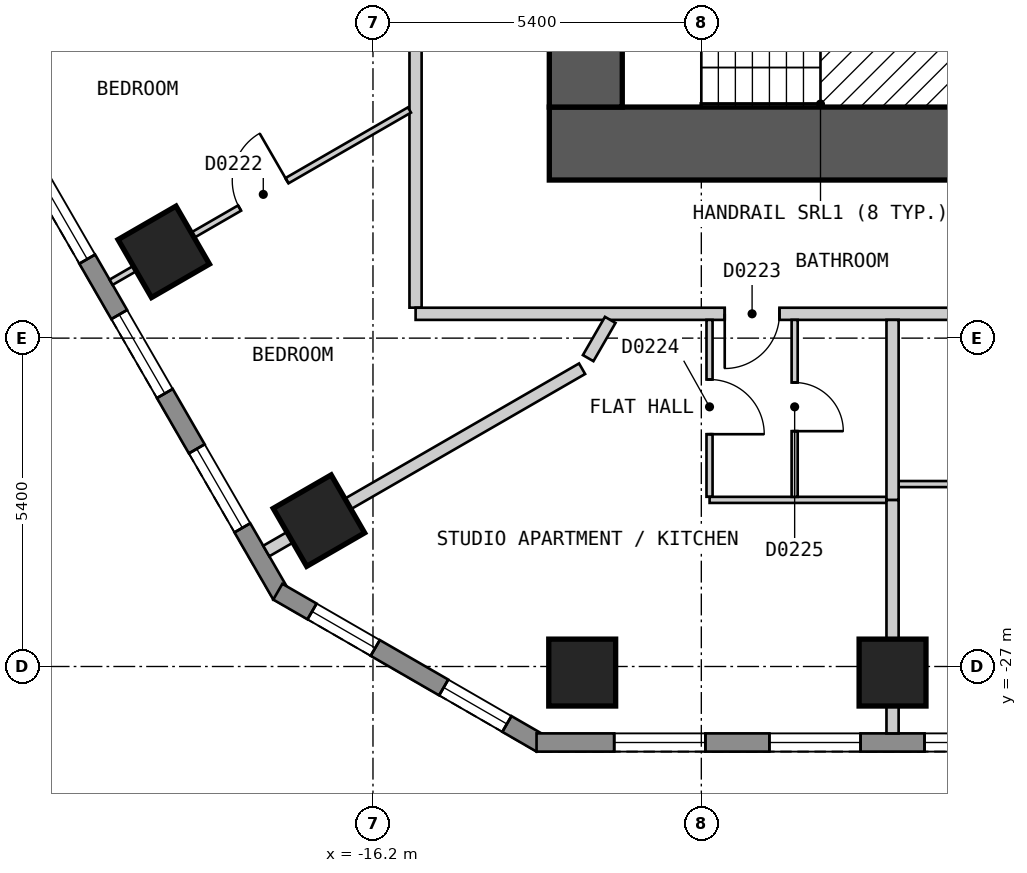
"""IFC4 building model, lengths in metres.
Left out: names, types, materials, properties, quantities, classifications, styles, units other than length and angle.
Written with IfcOpenShell. Run it as: python <this file> out.ifc"""

import sys

from ifc_helpers import new_model, si_unit, direction, frame, frame_2d, origin, origin_2d, place, context, subcontext, project, spatial, polyline, rectangle, outline, extrude, element, fill, save


model = new_model("IFC4")
c1 = context("Model", 3, precision=1e-05, world=origin(), true_north=direction((0.0, 1.0)))
c2 = subcontext(c1, "Body", "Model", "MODEL_VIEW")
j1 = project(units=[si_unit("LENGTHUNIT", "METRE"), si_unit("PLANEANGLEUNIT", "RADIAN")], contexts=[c1])
p1 = place(None, origin())
s1 = spatial("IfcSite", under=j1, at=p1, CompositionType="ELEMENT")
p2 = place(p1, origin())
s2 = spatial("IfcBuilding", under=s1, at=p2, CompositionType="ELEMENT")
p3 = place(p2, frame((0.0, 0.0, 41.4)))
s3 = spatial("IfcBuildingStorey", under=s2, at=p3, CompositionType="ELEMENT", Elevation=41.4)
for number, where, z_axis, x_axis in (
    (1, (-19.641, -20.181, 0.0), (0.0, 0.0, 1.0), (0.5, -0.866, 0.0)),
    (2, (-17.089, -24.601, 0.0), (0.0, 0.0, 1.0), (0.5, -0.866, 0.0)),
    (3, (-12.759, -27.1, 0.0), (0.0, 0.0, 1.0), (1.0, 0.0, 0.0)),
    (4, (-7.655, -27.1, 0.0), (0.0, 0.0, 1.0), (1.0, 0.0, 0.0)),
):
    element("IfcColumn", number, at=place(p3, frame(where, z_axis=z_axis, x_axis=x_axis)), inside=s3, PredefinedType="COLUMN", context=c2, shape_type="SweptSolid", body=[
        extrude(rectangle(XDim=1.1, YDim=1.1, at=origin_2d()), origin(), (0.0, 0.0, 1.0), 3.0),
    ])
p4 = place(p3, frame((-13.3, -18.4, 0.0), z_axis=(0.0, 0.0, 1.0), x_axis=(1.0, 0.0, 0.0)))
e5 = element("IfcWall", 5, at=p4, inside=s3, PredefinedType="SHEAR", context=c2, shape_type="SweptSolid", body=[
    extrude(rectangle(XDim=26.6, YDim=1.2, at=frame_2d((13.3, 0.0))), origin(), (0.0, 0.0, 1.0), 2.7),
])
p5 = place(p3, frame((-12.7, -17.8, 0.0), z_axis=(0.0, 0.0, 1.0), x_axis=(0.0, 1.0, 0.0)))
e6 = element("IfcWall", 6, at=p5, inside=s3, PredefinedType="SHEAR", context=c2, shape_type="SweptSolid", body=[
    extrude(rectangle(XDim=11.6, YDim=1.2, at=frame_2d((5.8, 0.0))), origin(), (0.0, 0.0, 1.0), 2.7),
])
p6 = place(p5, frame((3.6, 0.0, 0.0)))
e7 = element("IfcOpeningElement", 7, at=p6, cuts=e6, PredefinedType="OPENING", context=c2, shape_type="SweptSolid", body=[
    extrude(rectangle(XDim=1.2, YDim=2.1, at=frame_2d((0.6, 1.05))), frame((0.0, 0.61, 0.0), z_axis=(0.0, -1.0, 0.0), x_axis=(1.0, 0.0, 0.0)), (0.0, 0.0, 1.0), 1.22),
])
p7 = place(p3, frame((-31.22, -2.425, 0.0), z_axis=(0.0, 0.0, 1.0), x_axis=(0.500001938803, -0.866024284413, 0.0)))
e8 = element("IfcWall", 8, at=p7, inside=s3, PredefinedType="SOLIDWALL", context=c2, shape_type="SweptSolid", body=[
    extrude(outline(polyline([(0.0, -0.15), (27.02, -0.15), (26.94, 0.15), (0.08, 0.15), (0.0, -0.15)])), origin(), (0.0, 0.0, 1.0), 2.7),
])
p8 = place(p7, frame((1.277, 0.0, 0.15)))
e9 = element("IfcOpeningElement", 9, at=p8, cuts=e8, PredefinedType="OPENING", context=c2, shape_type="SweptSolid", body=[
    extrude(rectangle(XDim=1.5, YDim=2.1, at=frame_2d((0.75, 1.05))), frame((0.0, 0.16, 0.0), z_axis=(0.0, -1.0, 0.0), x_axis=(1.0, 0.0, 0.0)), (0.0, 0.0, 1.0), 0.32),
])
p9 = place(p7, frame((3.829, 0.0, 0.15)))
e10 = element("IfcOpeningElement", 10, at=p9, cuts=e8, PredefinedType="OPENING", context=c2, shape_type="SweptSolid", body=[
    extrude(rectangle(XDim=1.5, YDim=2.1, at=frame_2d((0.75, 1.05))), frame((0.0, 0.16, 0.0), z_axis=(0.0, -1.0, 0.0), x_axis=(1.0, 0.0, 0.0)), (0.0, 0.0, 1.0), 0.32),
])
p10 = place(p7, frame((6.382, 0.0, 0.15)))
e11 = element("IfcOpeningElement", 11, at=p10, cuts=e8, PredefinedType="OPENING", context=c2, shape_type="SweptSolid", body=[
    extrude(rectangle(XDim=1.5, YDim=2.1, at=frame_2d((0.75, 1.05))), frame((0.0, 0.16, 0.0), z_axis=(0.0, -1.0, 0.0), x_axis=(1.0, 0.0, 0.0)), (0.0, 0.0, 1.0), 0.32),
])
p11 = place(p7, frame((8.933, 0.0, 0.15)))
e12 = element("IfcOpeningElement", 12, at=p11, cuts=e8, PredefinedType="OPENING", context=c2, shape_type="SweptSolid", body=[
    extrude(rectangle(XDim=1.5, YDim=2.1, at=frame_2d((0.75, 1.05))), frame((0.0, 0.16, 0.0), z_axis=(0.0, -1.0, 0.0), x_axis=(1.0, 0.0, 0.0)), (0.0, 0.0, 1.0), 0.32),
])
p12 = place(p7, frame((11.485, 0.0, 0.15)))
e13 = element("IfcOpeningElement", 13, at=p12, cuts=e8, PredefinedType="OPENING", context=c2, shape_type="SweptSolid", body=[
    extrude(rectangle(XDim=1.5, YDim=2.1, at=frame_2d((0.75, 1.05))), frame((0.0, 0.16, 0.0), z_axis=(0.0, -1.0, 0.0), x_axis=(1.0, 0.0, 0.0)), (0.0, 0.0, 1.0), 0.32),
])
p13 = place(p7, frame((14.037, 0.0, 0.15)))
e14 = element("IfcOpeningElement", 14, at=p13, cuts=e8, PredefinedType="OPENING", context=c2, shape_type="SweptSolid", body=[
    extrude(rectangle(XDim=1.5, YDim=2.1, at=frame_2d((0.75, 1.05))), frame((0.0, 0.16, 0.0), z_axis=(0.0, -1.0, 0.0), x_axis=(1.0, 0.0, 0.0)), (0.0, 0.0, 1.0), 0.32),
])
p14 = place(p7, frame((16.589, 0.0, 0.15)))
e15 = element("IfcOpeningElement", 15, at=p14, cuts=e8, PredefinedType="OPENING", context=c2, shape_type="SweptSolid", body=[
    extrude(rectangle(XDim=1.5, YDim=2.1, at=frame_2d((0.75, 1.05))), frame((0.0, 0.16, 0.0), z_axis=(0.0, -1.0, 0.0), x_axis=(1.0, 0.0, 0.0)), (0.0, 0.0, 1.0), 0.32),
])
p15 = place(p7, frame((19.141, 0.0, 0.15)))
e16 = element("IfcOpeningElement", 16, at=p15, cuts=e8, PredefinedType="OPENING", context=c2, shape_type="SweptSolid", body=[
    extrude(rectangle(XDim=1.5, YDim=2.1, at=frame_2d((0.75, 1.05))), frame((0.0, 0.16, 0.0), z_axis=(0.0, -1.0, 0.0), x_axis=(1.0, 0.0, 0.0)), (0.0, 0.0, 1.0), 0.32),
])
p16 = place(p7, frame((21.693, 0.0, 0.15)))
e17 = element("IfcOpeningElement", 17, at=p16, cuts=e8, PredefinedType="OPENING", context=c2, shape_type="SweptSolid", body=[
    extrude(rectangle(XDim=1.5, YDim=2.1, at=frame_2d((0.75, 1.05))), frame((0.0, 0.16, 0.0), z_axis=(0.0, -1.0, 0.0), x_axis=(1.0, 0.0, 0.0)), (0.0, 0.0, 1.0), 0.32),
])
p17 = place(p7, frame((24.244, 0.0, 0.15)))
e18 = element("IfcOpeningElement", 18, at=p17, cuts=e8, PredefinedType="OPENING", context=c2, shape_type="SweptSolid", body=[
    extrude(rectangle(XDim=1.5, YDim=2.1, at=frame_2d((0.75, 1.05))), frame((0.0, 0.16, 0.0), z_axis=(0.0, -1.0, 0.0), x_axis=(1.0, 0.0, 0.0)), (0.0, 0.0, 1.0), 0.32),
])
p18 = place(p3, frame((-17.765, -25.77, 0.0), z_axis=(0.0, 0.0, 1.0), x_axis=(0.866010750942, -0.50002537861, 0.0)))
e19 = element("IfcWall", 19, at=p18, inside=s3, PredefinedType="SOLIDWALL", context=c2, shape_type="SweptSolid", body=[
    extrude(outline(polyline([(0.0, -0.15), (5.0, -0.15), (4.919, 0.15), (0.08, 0.15), (0.0, -0.15)])), origin(), (0.0, 0.0, 1.0), 2.7),
])
p19 = place(p18, frame((0.65, 0.0, 0.15)))
e20 = element("IfcOpeningElement", 20, at=p19, cuts=e19, PredefinedType="OPENING", context=c2, shape_type="SweptSolid", body=[
    extrude(rectangle(XDim=1.2, YDim=2.1, at=frame_2d((0.6, 1.05))), frame((0.0, 0.16, 0.0), z_axis=(0.0, -1.0, 0.0), x_axis=(1.0, 0.0, 0.0)), (0.0, 0.0, 1.0), 0.32),
])
p20 = place(p18, frame((3.15, 0.0, 0.15)))
e21 = element("IfcOpeningElement", 21, at=p20, cuts=e19, PredefinedType="OPENING", context=c2, shape_type="SweptSolid", body=[
    extrude(rectangle(XDim=1.2, YDim=2.1, at=frame_2d((0.6, 1.05))), frame((0.0, 0.16, 0.0), z_axis=(0.0, -1.0, 0.0), x_axis=(1.0, 0.0, 0.0)), (0.0, 0.0, 1.0), 0.32),
])
p21 = place(p3, frame((-13.51, -28.25, 0.0), z_axis=(0.0, 0.0, 1.0), x_axis=(1.0, 0.0, 0.0)))
e22 = element("IfcWall", 22, at=p21, inside=s3, PredefinedType="SOLIDWALL", context=c2, shape_type="SweptSolid", body=[
    extrude(outline(polyline([(0.0, -0.15), (27.02, -0.15), (26.94, 0.15), (0.08, 0.15), (0.0, -0.15)])), origin(), (0.0, 0.0, 1.0), 2.7),
])
p22 = place(p21, frame((1.277, 0.0, 0.15)))
e23 = element("IfcOpeningElement", 23, at=p22, cuts=e22, PredefinedType="OPENING", context=c2, shape_type="SweptSolid", body=[
    extrude(rectangle(XDim=1.5, YDim=2.1, at=frame_2d((0.75, 1.05))), frame((0.0, 0.16, 0.0), z_axis=(0.0, -1.0, 0.0), x_axis=(1.0, 0.0, 0.0)), (0.0, 0.0, 1.0), 0.32),
])
p23 = place(p21, frame((3.829, 0.0, 0.15)))
e24 = element("IfcOpeningElement", 24, at=p23, cuts=e22, PredefinedType="OPENING", context=c2, shape_type="SweptSolid", body=[
    extrude(rectangle(XDim=1.5, YDim=2.1, at=frame_2d((0.75, 1.05))), frame((0.0, 0.16, 0.0), z_axis=(0.0, -1.0, 0.0), x_axis=(1.0, 0.0, 0.0)), (0.0, 0.0, 1.0), 0.32),
])
p24 = place(p21, frame((6.381, 0.0, 0.15)))
e25 = element("IfcOpeningElement", 25, at=p24, cuts=e22, PredefinedType="OPENING", context=c2, shape_type="SweptSolid", body=[
    extrude(rectangle(XDim=1.5, YDim=2.1, at=frame_2d((0.75, 1.05))), frame((0.0, 0.16, 0.0), z_axis=(0.0, -1.0, 0.0), x_axis=(1.0, 0.0, 0.0)), (0.0, 0.0, 1.0), 0.32),
])
p25 = place(p21, frame((8.933, 0.0, 0.15)))
e26 = element("IfcOpeningElement", 26, at=p25, cuts=e22, PredefinedType="OPENING", context=c2, shape_type="SweptSolid", body=[
    extrude(rectangle(XDim=1.5, YDim=2.1, at=frame_2d((0.75, 1.05))), frame((0.0, 0.16, 0.0), z_axis=(0.0, -1.0, 0.0), x_axis=(1.0, 0.0, 0.0)), (0.0, 0.0, 1.0), 0.32),
])
p26 = place(p21, frame((11.485, 0.0, 0.15)))
e27 = element("IfcOpeningElement", 27, at=p26, cuts=e22, PredefinedType="OPENING", context=c2, shape_type="SweptSolid", body=[
    extrude(rectangle(XDim=1.5, YDim=2.1, at=frame_2d((0.75, 1.05))), frame((0.0, 0.16, 0.0), z_axis=(0.0, -1.0, 0.0), x_axis=(1.0, 0.0, 0.0)), (0.0, 0.0, 1.0), 0.32),
])
p27 = place(p21, frame((14.037, 0.0, 0.15)))
e28 = element("IfcOpeningElement", 28, at=p27, cuts=e22, PredefinedType="OPENING", context=c2, shape_type="SweptSolid", body=[
    extrude(rectangle(XDim=1.5, YDim=2.1, at=frame_2d((0.75, 1.05))), frame((0.0, 0.16, 0.0), z_axis=(0.0, -1.0, 0.0), x_axis=(1.0, 0.0, 0.0)), (0.0, 0.0, 1.0), 0.32),
])
p28 = place(p21, frame((16.589, 0.0, 0.15)))
e29 = element("IfcOpeningElement", 29, at=p28, cuts=e22, PredefinedType="OPENING", context=c2, shape_type="SweptSolid", body=[
    extrude(rectangle(XDim=1.5, YDim=2.1, at=frame_2d((0.75, 1.05))), frame((0.0, 0.16, 0.0), z_axis=(0.0, -1.0, 0.0), x_axis=(1.0, 0.0, 0.0)), (0.0, 0.0, 1.0), 0.32),
])
p29 = place(p21, frame((19.141, 0.0, 0.15)))
e30 = element("IfcOpeningElement", 30, at=p29, cuts=e22, PredefinedType="OPENING", context=c2, shape_type="SweptSolid", body=[
    extrude(rectangle(XDim=1.5, YDim=2.1, at=frame_2d((0.75, 1.05))), frame((0.0, 0.16, 0.0), z_axis=(0.0, -1.0, 0.0), x_axis=(1.0, 0.0, 0.0)), (0.0, 0.0, 1.0), 0.32),
])
p30 = place(p21, frame((21.693, 0.0, 0.15)))
e31 = element("IfcOpeningElement", 31, at=p30, cuts=e22, PredefinedType="OPENING", context=c2, shape_type="SweptSolid", body=[
    extrude(rectangle(XDim=1.5, YDim=2.1, at=frame_2d((0.75, 1.05))), frame((0.0, 0.16, 0.0), z_axis=(0.0, -1.0, 0.0), x_axis=(1.0, 0.0, 0.0)), (0.0, 0.0, 1.0), 0.32),
])
p31 = place(p21, frame((24.245, 0.0, 0.15)))
e32 = element("IfcOpeningElement", 32, at=p31, cuts=e22, PredefinedType="OPENING", context=c2, shape_type="SweptSolid", body=[
    extrude(rectangle(XDim=1.5, YDim=2.1, at=frame_2d((0.75, 1.05))), frame((0.0, 0.16, 0.0), z_axis=(0.0, -1.0, 0.0), x_axis=(1.0, 0.0, 0.0)), (0.0, 0.0, 1.0), 0.32),
])
p32 = place(p3, frame((-15.5, -16.5, 0.0), z_axis=(0.0, 0.0, 1.0), x_axis=(0.0, -1.0, 0.0)))
e33 = element("IfcWall", 33, at=p32, inside=s3, PredefinedType="PARTITIONING", context=c2, shape_type="SweptSolid", body=[
    extrude(rectangle(XDim=4.599, YDim=0.2, at=frame_2d((2.3, 0.0))), origin(), (0.0, 0.0, 1.0), 2.7),
])
p33 = place(p3, frame((-15.499, -21.2, 0.0), z_axis=(0.0, 0.0, 1.0), x_axis=(1.0, 0.0, 0.0)))
e34 = element("IfcWall", 34, at=p33, inside=s3, PredefinedType="PARTITIONING", context=c2, shape_type="SweptSolid", body=[
    extrude(rectangle(XDim=30.898, YDim=0.2, at=frame_2d((15.449, 0.0))), origin(), (0.0, 0.0, 1.0), 2.7),
])
p34 = place(p33, frame((5.084, 0.0, 0.0)))
e35 = element("IfcOpeningElement", 35, at=p34, cuts=e34, PredefinedType="OPENING", context=c2, shape_type="SweptSolid", body=[
    extrude(rectangle(XDim=0.9, YDim=2.1, at=frame_2d((0.45, 1.05))), frame((0.0, 0.11, 0.0), z_axis=(0.0, -1.0, 0.0), x_axis=(1.0, 0.0, 0.0)), (0.0, 0.0, 1.0), 0.22),
])
p35 = place(p33, frame((15.0, 0.0, 0.0)))
e36 = element("IfcOpeningElement", 36, at=p35, cuts=e34, PredefinedType="OPENING", context=c2, shape_type="SweptSolid", body=[
    extrude(rectangle(XDim=1.0, YDim=2.1, at=frame_2d((0.5, 1.05))), frame((0.0, 0.11, 0.0), z_axis=(0.0, -1.0, 0.0), x_axis=(1.0, 0.0, 0.0)), (0.0, 0.0, 1.0), 0.22),
])
p36 = place(p33, frame((25.015, 0.0, 0.0)))
e37 = element("IfcOpeningElement", 37, at=p36, cuts=e34, PredefinedType="OPENING", context=c2, shape_type="SweptSolid", body=[
    extrude(rectangle(XDim=0.9, YDim=2.1, at=frame_2d((0.45, 1.05))), frame((0.0, 0.11, 0.0), z_axis=(0.0, -1.0, 0.0), x_axis=(1.0, 0.0, 0.0)), (0.0, 0.0, 1.0), 0.22),
])
p37 = place(p3, frame((-10.665, -21.3, 0.0), z_axis=(0.0, 0.0, 1.0), x_axis=(0.0, -1.0, 0.0)))
e38 = element("IfcWall", 38, at=p37, inside=s3, PredefinedType="PARTITIONING", context=c2, shape_type="SweptSolid", body=[
    extrude(rectangle(XDim=2.909, YDim=0.1, at=frame_2d((1.455, 0.0))), origin(), (0.0, 0.0, 1.0), 2.7),
])
p38 = place(p37, frame((0.98, 0.0, 0.0)))
e39 = element("IfcOpeningElement", 39, at=p38, cuts=e38, PredefinedType="OPENING", context=c2, shape_type="SweptSolid", body=[
    extrude(rectangle(XDim=0.9, YDim=2.1, at=frame_2d((0.45, 1.05))), frame((0.0, 0.06, 0.0), z_axis=(0.0, -1.0, 0.0), x_axis=(1.0, 0.0, 0.0)), (0.0, 0.0, 1.0), 0.12),
])
p39 = place(p3, frame((-7.555, -24.0, 0.0), z_axis=(0.0, 0.0, 1.0), x_axis=(1.0, 0.0, 0.0)))
e40 = element("IfcWall", 40, at=p39, inside=s3, PredefinedType="PARTITIONING", context=c2, shape_type="SweptSolid", body=[
    extrude(rectangle(XDim=4.954, YDim=0.1, at=frame_2d((2.477, 0.0))), origin(), (0.0, 0.0, 1.0), 2.7),
])
p40 = place(p39, frame((2.052, 0.0, 0.0)))
e41 = element("IfcOpeningElement", 41, at=p40, cuts=e40, PredefinedType="OPENING", context=c2, shape_type="SweptSolid", body=[
    extrude(rectangle(XDim=0.8, YDim=2.1, at=frame_2d((0.4, 1.05))), frame((0.0, 0.06, 0.0), z_axis=(0.0, -1.0, 0.0), x_axis=(1.0, 0.0, 0.0)), (0.0, 0.0, 1.0), 0.12),
])
p41 = place(p3, frame((-10.664, -24.26, 0.0), z_axis=(0.0, 0.0, 1.0), x_axis=(1.0, 0.0, 0.0)))
e42 = element("IfcWall", 42, at=p41, inside=s3, PredefinedType="PARTITIONING", context=c2, shape_type="SweptSolid", body=[
    extrude(rectangle(XDim=2.909, YDim=0.1, at=frame_2d((1.455, 0.0))), origin(), (0.0, 0.0, 1.0), 2.7),
])
p42 = place(p3, frame((-9.265, -24.21, 0.0), z_axis=(0.0, 0.0, 1.0), x_axis=(0.0, 1.0, 0.0)))
e43 = element("IfcWall", 43, at=p42, inside=s3, PredefinedType="PARTITIONING", context=c2, shape_type="SweptSolid", body=[
    extrude(rectangle(XDim=2.91, YDim=0.1, at=frame_2d((1.455, 0.0))), origin(), (0.0, 0.0, 1.0), 2.7),
])
p43 = place(p42, frame((1.08, 0.0, 0.0)))
e44 = element("IfcOpeningElement", 44, at=p43, cuts=e43, PredefinedType="OPENING", context=c2, shape_type="SweptSolid", body=[
    extrude(rectangle(XDim=0.8, YDim=2.1, at=frame_2d((0.4, 1.05))), frame((0.0, 0.06, 0.0), z_axis=(0.0, -1.0, 0.0), x_axis=(1.0, 0.0, 0.0)), (0.0, 0.0, 1.0), 0.12),
])
p44 = place(p3, frame((-20.507, -20.681, 0.0), z_axis=(0.0, 0.0, 1.0), x_axis=(0.866028446103, 0.499994730513, 0.0)))
e45 = element("IfcWall", 45, at=p44, inside=s3, PredefinedType="PARTITIONING", context=c2, shape_type="SweptSolid", body=[
    extrude(rectangle(XDim=5.666, YDim=0.1, at=frame_2d((2.833, 0.0))), origin(), (0.0, 0.0, 1.0), 2.7),
])
p45 = place(p44, frame((2.44, 0.0, 0.0)))
e46 = element("IfcOpeningElement", 46, at=p45, cuts=e45, PredefinedType="OPENING", context=c2, shape_type="SweptSolid", body=[
    extrude(rectangle(XDim=0.9, YDim=2.1, at=frame_2d((0.45, 1.05))), frame((0.0, 0.06, 0.0), z_axis=(0.0, -1.0, 0.0), x_axis=(1.0, 0.0, 0.0)), (0.0, 0.0, 1.0), 0.12),
])
p46 = place(p3, frame((-7.655, -24.26, 0.0), z_axis=(0.0, 0.0, 1.0), x_axis=(0.0, -1.0, 0.0)))
e47 = element("IfcWall", 47, at=p46, inside=s3, PredefinedType="PARTITIONING", context=c2, shape_type="SweptSolid", body=[
    extrude(rectangle(XDim=3.84, YDim=0.2, at=frame_2d((1.92, 0.0))), origin(), (0.0, 0.0, 1.0), 2.7),
])
p47 = place(p3, frame((-12.661, -21.929, 0.0), z_axis=(0.0, 0.0, 1.0), x_axis=(0.499683639304, 0.866207977689, 0.0)))
e48 = element("IfcWall", 48, at=p47, inside=s3, PredefinedType="PARTITIONING", context=c2, shape_type="SweptSolid", body=[
    extrude(rectangle(XDim=0.726, YDim=0.2, at=frame_2d((0.363, 0.0))), origin(), (0.0, 0.0, 1.0), 2.7),
])
p48 = place(p3, frame((-7.655, -24.26, 0.0), z_axis=(0.0, 0.0, 1.0), x_axis=(0.0, 1.0, 0.0)))
e49 = element("IfcWall", 49, at=p48, inside=s3, PredefinedType="PARTITIONING", context=c2, shape_type="SweptSolid", body=[
    extrude(rectangle(XDim=2.96, YDim=0.2, at=frame_2d((1.48, 0.0))), origin(), (0.0, 0.0, 1.0), 2.7),
])
p49 = place(p3, frame((-17.955, -25.101, 0.0), z_axis=(0.0, 0.0, 1.0), x_axis=(0.866080519133, 0.499904525262, 0.0)))
e50 = element("IfcWall", 50, at=p49, inside=s3, PredefinedType="PARTITIONING", context=c2, shape_type="SweptSolid", body=[
    extrude(rectangle(XDim=5.997, YDim=0.2, at=frame_2d((2.999, 0.0))), origin(), (0.0, 0.0, 1.0), 2.7),
])
p50 = place(p15, origin())
e51 = element("IfcWindow", 51, at=p50, inside=s3, PartitioningType="SINGLE_PANEL", PredefinedType="WINDOW", context=c2, shape_type="SweptSolid", body=[
    extrude(rectangle(XDim=1.5, YDim=2.1, at=frame_2d((0.75, 1.05))), frame((0.0, 0.03, 0.0), z_axis=(0.0, -1.0, 0.0), x_axis=(1.0, 0.0, 0.0)), (0.0, 0.0, 1.0), 0.06),
])
fill(e16, e51)
p51 = place(p16, origin())
e52 = element("IfcWindow", 52, at=p51, inside=s3, PartitioningType="SINGLE_PANEL", PredefinedType="WINDOW", context=c2, shape_type="SweptSolid", body=[
    extrude(rectangle(XDim=1.5, YDim=2.1, at=frame_2d((0.75, 1.05))), frame((0.0, 0.03, 0.0), z_axis=(0.0, -1.0, 0.0), x_axis=(1.0, 0.0, 0.0)), (0.0, 0.0, 1.0), 0.06),
])
fill(e17, e52)
p52 = place(p17, origin())
e53 = element("IfcWindow", 53, at=p52, inside=s3, PartitioningType="SINGLE_PANEL", PredefinedType="WINDOW", context=c2, shape_type="SweptSolid", body=[
    extrude(rectangle(XDim=1.5, YDim=2.1, at=frame_2d((0.75, 1.05))), frame((0.0, 0.03, 0.0), z_axis=(0.0, -1.0, 0.0), x_axis=(1.0, 0.0, 0.0)), (0.0, 0.0, 1.0), 0.06),
])
fill(e18, e53)
p53 = place(p19, origin())
e54 = element("IfcWindow", 54, at=p53, inside=s3, PartitioningType="SINGLE_PANEL", PredefinedType="WINDOW", context=c2, shape_type="SweptSolid", body=[
    extrude(rectangle(XDim=1.2, YDim=2.1, at=frame_2d((0.6, 1.05))), frame((0.0, 0.03, 0.0), z_axis=(0.0, -1.0, 0.0), x_axis=(1.0, 0.0, 0.0)), (0.0, 0.0, 1.0), 0.06),
])
fill(e20, e54)
p54 = place(p20, origin())
e55 = element("IfcWindow", 55, at=p54, inside=s3, PartitioningType="SINGLE_PANEL", PredefinedType="WINDOW", context=c2, shape_type="SweptSolid", body=[
    extrude(rectangle(XDim=1.2, YDim=2.1, at=frame_2d((0.6, 1.05))), frame((0.0, 0.03, 0.0), z_axis=(0.0, -1.0, 0.0), x_axis=(1.0, 0.0, 0.0)), (0.0, 0.0, 1.0), 0.06),
])
fill(e21, e55)
p55 = place(p22, origin())
e56 = element("IfcWindow", 56, at=p55, inside=s3, PartitioningType="SINGLE_PANEL", PredefinedType="WINDOW", context=c2, shape_type="SweptSolid", body=[
    extrude(rectangle(XDim=1.5, YDim=2.1, at=frame_2d((0.75, 1.05))), frame((0.0, 0.03, 0.0), z_axis=(0.0, -1.0, 0.0), x_axis=(1.0, 0.0, 0.0)), (0.0, 0.0, 1.0), 0.06),
])
fill(e23, e56)
p56 = place(p23, origin())
e57 = element("IfcWindow", 57, at=p56, inside=s3, PartitioningType="SINGLE_PANEL", PredefinedType="WINDOW", context=c2, shape_type="SweptSolid", body=[
    extrude(rectangle(XDim=1.5, YDim=2.1, at=frame_2d((0.75, 1.05))), frame((0.0, 0.03, 0.0), z_axis=(0.0, -1.0, 0.0), x_axis=(1.0, 0.0, 0.0)), (0.0, 0.0, 1.0), 0.06),
])
fill(e24, e57)
p57 = place(p24, origin())
e58 = element("IfcWindow", 58, at=p57, inside=s3, PartitioningType="SINGLE_PANEL", PredefinedType="WINDOW", context=c2, shape_type="SweptSolid", body=[
    extrude(rectangle(XDim=1.5, YDim=2.1, at=frame_2d((0.75, 1.05))), frame((0.0, 0.03, 0.0), z_axis=(0.0, -1.0, 0.0), x_axis=(1.0, 0.0, 0.0)), (0.0, 0.0, 1.0), 0.06),
])
fill(e25, e58)
p58 = place(p45, origin())
e59 = element("IfcDoor", 59, at=p58, inside=s3, OperationType="SINGLE_SWING_RIGHT", PredefinedType="DOOR", context=c2, shape_type="SweptSolid", body=[
    extrude(rectangle(XDim=0.9, YDim=2.1, at=frame_2d((0.45, 1.05))), frame((0.0, 0.025, 0.0), z_axis=(0.0, -1.0, 0.0), x_axis=(1.0, 0.0, 0.0)), (0.0, 0.0, 1.0), 0.05),
])
fill(e46, e59)
p59 = place(p34, origin())
e60 = element("IfcDoor", 60, at=p59, inside=s3, OperationType="SINGLE_SWING_LEFT", PredefinedType="DOOR", context=c2, shape_type="SweptSolid", body=[
    extrude(rectangle(XDim=0.9, YDim=2.1, at=frame_2d((0.45, 1.05))), frame((0.0, 0.025, 0.0), z_axis=(0.0, -1.0, 0.0), x_axis=(1.0, 0.0, 0.0)), (0.0, 0.0, 1.0), 0.05),
])
fill(e35, e60)
p60 = place(p38, origin())
e61 = element("IfcDoor", 61, at=p60, inside=s3, OperationType="SINGLE_SWING_RIGHT", PredefinedType="DOOR", context=c2, shape_type="SweptSolid", body=[
    extrude(rectangle(XDim=0.9, YDim=2.1, at=frame_2d((0.45, 1.05))), frame((0.0, 0.025, 0.0), z_axis=(0.0, -1.0, 0.0), x_axis=(1.0, 0.0, 0.0)), (0.0, 0.0, 1.0), 0.05),
])
fill(e39, e61)
p61 = place(p43, origin())
e62 = element("IfcDoor", 62, at=p61, inside=s3, OperationType="SINGLE_SWING_LEFT", PredefinedType="DOOR", context=c2, shape_type="SweptSolid", body=[
    extrude(rectangle(XDim=0.8, YDim=2.1, at=frame_2d((0.4, 1.05))), frame((0.0, 0.025, 0.0), z_axis=(0.0, -1.0, 0.0), x_axis=(1.0, 0.0, 0.0)), (0.0, 0.0, 1.0), 0.05),
])
fill(e44, e62)
save(model, sys.argv[1])
